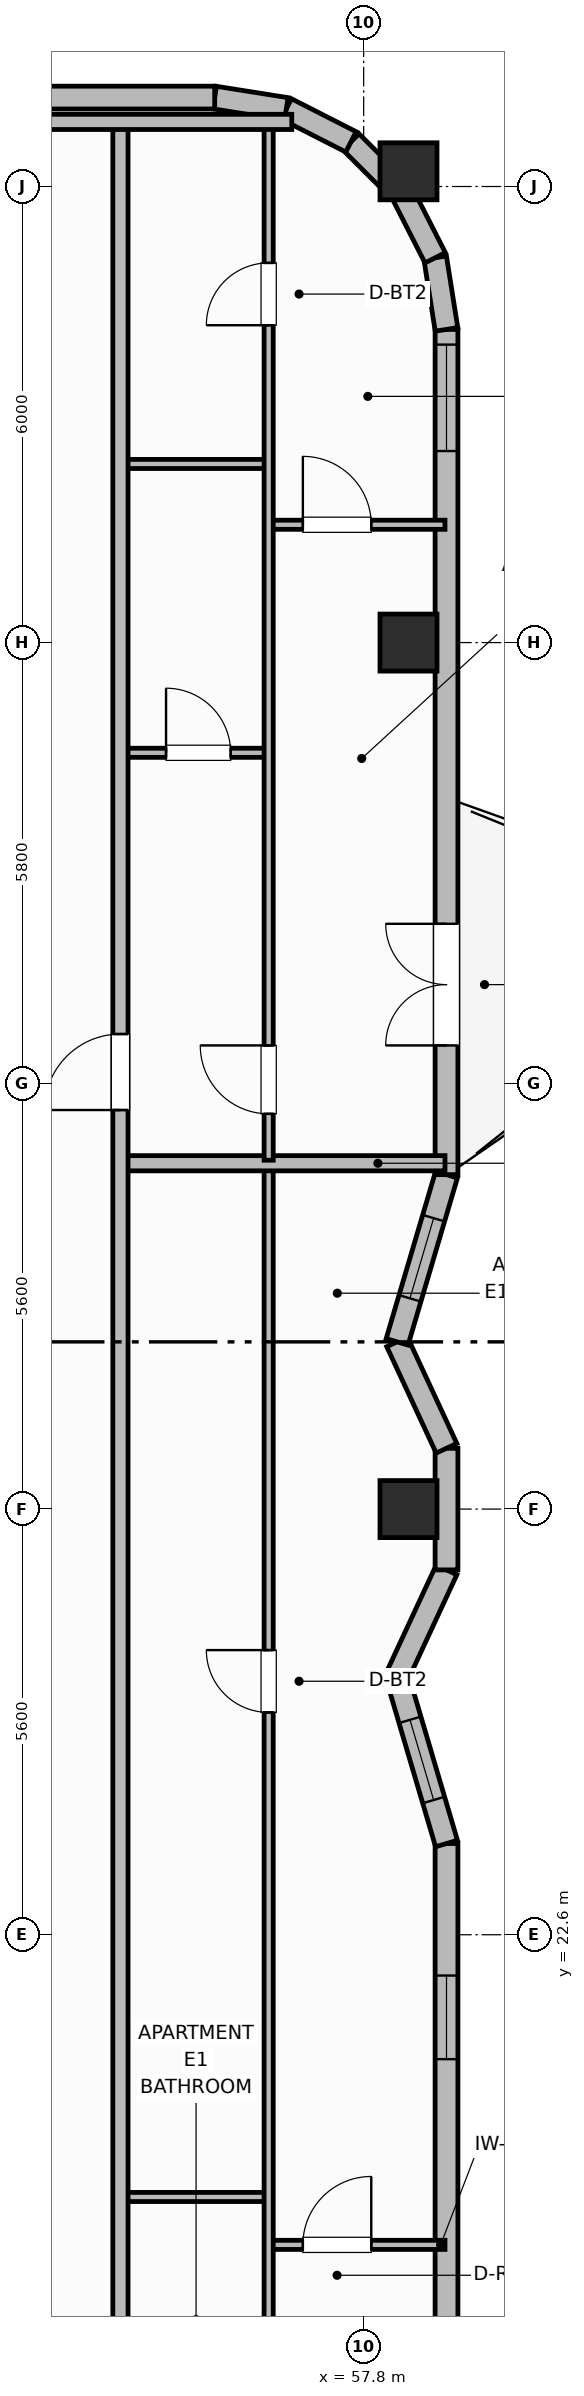
"""IFC4 building model, lengths in metres.
Left out: names, types, materials, properties, quantities, classifications, styles, units other than length and angle.
Written with IfcOpenShell. Run it as: python <this file> out.ifc"""

import sys

from ifc_helpers import new_model, si_unit, direction, frame, frame_2d, origin, origin_2d, place, context, subcontext, project, spatial, rectangle, extrude, element, fill, save


model = new_model("IFC4")
c1 = context("Model", 3, precision=1e-05, world=origin(), true_north=direction((0.0, 1.0)))
c2 = subcontext(c1, "Body", "Model", "MODEL_VIEW")
j1 = project(units=[si_unit("LENGTHUNIT", "METRE"), si_unit("PLANEANGLEUNIT", "RADIAN")], contexts=[c1])
p1 = place(None, origin())
s1 = spatial("IfcSite", under=j1, at=p1, CompositionType="ELEMENT")
p2 = place(p1, origin())
s2 = spatial("IfcBuilding", under=s1, at=p2, CompositionType="ELEMENT")
p3 = place(p2, frame((0.0, 0.0, 286.1)))
s3 = spatial("IfcBuildingStorey", under=s2, at=p3, CompositionType="ELEMENT", Elevation=286.1)
for number, where, z_axis, x_axis in (
    (1, (58.39, 28.2, 0.0), (0.0, 0.0, 1.0), (1.0, 0.0, 0.0)),
    (2, (58.39, 39.6, 0.0), (0.0, 0.0, 1.0), (1.0, 0.0, 0.0)),
    (3, (58.39, 45.8, 0.0), (0.0, 0.0, 1.0), (1.0, 0.0, 0.0)),
):
    element("IfcColumn", number, at=place(p3, frame(where, z_axis=z_axis, x_axis=x_axis)), inside=s3, PredefinedType="COLUMN", context=c2, shape_type="SweptSolid", body=[
        extrude(rectangle(XDim=0.75, YDim=0.75, at=origin_2d()), origin(), (0.0, 0.0, 1.0), 3.7),
    ])
p4 = place(p3, frame((58.89, 12.68, 0.0), z_axis=(0.0, 0.0, 1.0), x_axis=(0.0, 1.0, 0.0)))
e4 = element("IfcWall", 4, at=p4, inside=s3, PredefinedType="SOLIDWALL", context=c2, shape_type="SweptSolid", body=[
    extrude(rectangle(XDim=11.12, YDim=0.3, at=frame_2d((5.56, 0.0))), origin(), (0.0, 0.0, 1.0), 2.73),
])
p5 = place(p4, frame((1.737, 0.0, 0.95)))
e5 = element("IfcOpeningElement", 5, at=p5, cuts=e4, PredefinedType="OPENING", context=c2, shape_type="SweptSolid", body=[
    extrude(rectangle(XDim=1.1, YDim=1.65, at=frame_2d((0.55, 0.825))), frame((0.0, 0.16, 0.0), z_axis=(0.0, -1.0, 0.0), x_axis=(1.0, 0.0, 0.0)), (0.0, 0.0, 1.0), 0.32),
])
p6 = place(p4, frame((8.283, 0.0, 0.95)))
e6 = element("IfcOpeningElement", 6, at=p6, cuts=e4, PredefinedType="OPENING", context=c2, shape_type="SweptSolid", body=[
    extrude(rectangle(XDim=1.1, YDim=1.65, at=frame_2d((0.55, 0.825))), frame((0.0, 0.16, 0.0), z_axis=(0.0, -1.0, 0.0), x_axis=(1.0, 0.0, 0.0)), (0.0, 0.0, 1.0), 0.32),
])
p7 = place(p3, frame((58.89, 23.8, 0.0), z_axis=(0.0, 0.0, 1.0), x_axis=(-0.283312771328, 0.959027566654, 0.0)))
e7 = element("IfcWall", 7, at=p7, inside=s3, PredefinedType="SOLIDWALL", context=c2, shape_type="SweptSolid", body=[
    extrude(rectangle(XDim=2.294, YDim=0.3, at=frame_2d((1.147, 0.0))), origin(), (0.0, 0.0, 1.0), 2.73),
])
p8 = place(p7, frame((0.597, 0.0, 0.92)))
e8 = element("IfcOpeningElement", 8, at=p8, cuts=e7, PredefinedType="OPENING", context=c2, shape_type="SweptSolid", body=[
    extrude(rectangle(XDim=1.1, YDim=1.65, at=frame_2d((0.55, 0.825))), frame((0.0, 0.16, 0.0), z_axis=(0.0, -1.0, 0.0), x_axis=(1.0, 0.0, 0.0)), (0.0, 0.0, 1.0), 0.32),
])
p9 = place(p3, frame((58.24, 26.0, 0.0), z_axis=(0.0, 0.0, 1.0), x_axis=(0.421083420882, 0.907021914101, 0.0)))
e9 = element("IfcWall", 9, at=p9, inside=s3, PredefinedType="SOLIDWALL", context=c2, shape_type="SweptSolid", body=[
    extrude(rectangle(XDim=1.543, YDim=0.3, at=frame_2d((0.772, 0.0))), origin(), (0.0, 0.0, 1.0), 2.73),
])
p10 = place(p3, frame((58.89, 27.4, 0.0), z_axis=(0.0, 0.0, 1.0), x_axis=(0.0, 1.0, 0.0)))
e10 = element("IfcWall", 10, at=p10, inside=s3, PredefinedType="SOLIDWALL", context=c2, shape_type="SweptSolid", body=[
    extrude(rectangle(XDim=1.6, YDim=0.3, at=frame_2d((0.8, 0.0))), origin(), (0.0, 0.0, 1.0), 2.73),
])
p11 = place(p3, frame((58.89, 29.0, 0.0), z_axis=(0.0, 0.0, 1.0), x_axis=(-0.421083420882, 0.907021914101, 0.0)))
e11 = element("IfcWall", 11, at=p11, inside=s3, PredefinedType="SOLIDWALL", context=c2, shape_type="SweptSolid", body=[
    extrude(rectangle(XDim=1.543, YDim=0.3, at=frame_2d((0.772, 0.0))), origin(), (0.0, 0.0, 1.0), 2.73),
])
p12 = place(p3, frame((58.24, 30.4, 0.0), z_axis=(0.0, 0.0, 1.0), x_axis=(0.28328385701, 0.959036107953, 0.0)))
e12 = element("IfcWall", 12, at=p12, inside=s3, PredefinedType="SOLIDWALL", context=c2, shape_type="SweptSolid", body=[
    extrude(rectangle(XDim=2.294, YDim=0.3, at=frame_2d((1.147, 0.0))), origin(), (0.0, 0.0, 1.0), 2.73),
])
p13 = place(p12, frame((0.597, 0.0, 0.92)))
e13 = element("IfcOpeningElement", 13, at=p13, cuts=e12, PredefinedType="OPENING", context=c2, shape_type="SweptSolid", body=[
    extrude(rectangle(XDim=1.1, YDim=1.65, at=frame_2d((0.55, 0.825))), frame((0.0, 0.16, 0.0), z_axis=(0.0, -1.0, 0.0), x_axis=(1.0, 0.0, 0.0)), (0.0, 0.0, 1.0), 0.32),
])
p14 = place(p3, frame((58.89, 32.6, 0.0), z_axis=(0.0, 0.0, 1.0), x_axis=(0.0, 1.0, 0.0)))
e14 = element("IfcWall", 14, at=p14, inside=s3, PredefinedType="SOLIDWALL", context=c2, shape_type="SweptSolid", body=[
    extrude(rectangle(XDim=11.12, YDim=0.3, at=frame_2d((5.56, 0.0))), origin(), (0.0, 0.0, 1.0), 2.73),
])
p15 = place(p14, frame((1.7, 0.0, 0.0)))
e15 = element("IfcOpeningElement", 15, at=p15, cuts=e14, PredefinedType="OPENING", context=c2, shape_type="SweptSolid", body=[
    extrude(rectangle(XDim=1.6, YDim=2.1, at=frame_2d((0.8, 1.05))), frame((0.0, 0.16, 0.0), z_axis=(0.0, -1.0, 0.0), x_axis=(1.0, 0.0, 0.0)), (0.0, 0.0, 1.0), 0.32),
])
p16 = place(p14, frame((9.52, 0.0, 0.72)))
e16 = element("IfcOpeningElement", 16, at=p16, cuts=e14, PredefinedType="OPENING", context=c2, shape_type="SweptSolid", body=[
    extrude(rectangle(XDim=1.4, YDim=1.85, at=frame_2d((0.7, 0.925))), frame((0.0, 0.16, 0.0), z_axis=(0.0, -1.0, 0.0), x_axis=(1.0, 0.0, 0.0)), (0.0, 0.0, 1.0), 0.32),
])
p17 = place(p3, frame((58.89, 43.72, 0.0), z_axis=(0.0, 0.0, 1.0), x_axis=(-0.156304114255, 0.987708977314, 0.0)))
e17 = element("IfcWall", 17, at=p17, inside=s3, PredefinedType="SOLIDWALL", context=c2, shape_type="SweptSolid", body=[
    extrude(rectangle(XDim=0.954, YDim=0.3, at=frame_2d((0.477, 0.0))), origin(), (0.0, 0.0, 1.0), 2.73),
])
p18 = place(p3, frame((58.741, 44.663, 0.0), z_axis=(0.0, 0.0, 1.0), x_axis=(-0.45395644796, 0.891023873617, 0.0)))
e18 = element("IfcWall", 18, at=p18, inside=s3, PredefinedType="SOLIDWALL", context=c2, shape_type="SweptSolid", body=[
    extrude(rectangle(XDim=0.954, YDim=0.3, at=frame_2d((0.477, 0.0))), origin(), (0.0, 0.0, 1.0), 2.73),
])
for number, where, z_axis, x_axis in (
    (19, (58.308, 45.513, 0.0), (0.0, 0.0, 1.0), (-0.707, 0.707, 0.0)),
    (20, (57.633, 46.188, 0.0), (0.0, 0.0, 1.0), (-0.891, 0.454, 0.0)),
):
    element("IfcWall", number, at=place(p3, frame(where, z_axis=z_axis, x_axis=x_axis)), inside=s3, PredefinedType="SOLIDWALL", context=c2, shape_type="SweptSolid", body=[
        extrude(rectangle(XDim=0.954, YDim=0.3, at=frame_2d((0.477, 0.0))), origin(), (0.0, 0.0, 1.0), 2.73),
    ])
p19 = place(p3, frame((56.782, 46.621, 0.0), z_axis=(0.0, 0.0, 1.0), x_axis=(-0.987663181641, 0.156593229835, 0.0)))
e21 = element("IfcWall", 21, at=p19, inside=s3, PredefinedType="SOLIDWALL", context=c2, shape_type="SweptSolid", body=[
    extrude(rectangle(XDim=0.954, YDim=0.3, at=frame_2d((0.477, 0.0))), origin(), (0.0, 0.0, 1.0), 2.73),
])
p20 = place(p3, frame((55.84, 46.77, 0.0), z_axis=(0.0, 0.0, 1.0), x_axis=(-1.0, 0.0, 0.0)))
e22 = element("IfcWall", 22, at=p20, inside=s3, PredefinedType="SOLIDWALL", context=c2, shape_type="SweptSolid", body=[
    extrude(rectangle(XDim=33.28, YDim=0.3, at=frame_2d((16.64, 0.0))), origin(), (0.0, 0.0, 1.0), 2.73),
])
p21 = place(p20, frame((5.08, 0.0, 0.76)))
e23 = element("IfcOpeningElement", 23, at=p21, cuts=e22, PredefinedType="OPENING", context=c2, shape_type="SweptSolid", body=[
    extrude(rectangle(XDim=1.8, YDim=1.85, at=frame_2d((0.9, 0.925))), frame((0.0, 0.16, 0.0), z_axis=(0.0, -1.0, 0.0), x_axis=(1.0, 0.0, 0.0)), (0.0, 0.0, 1.0), 0.32),
])
p22 = place(p20, frame((8.633, 0.0, 0.76)))
e24 = element("IfcOpeningElement", 24, at=p22, cuts=e22, PredefinedType="OPENING", context=c2, shape_type="SweptSolid", body=[
    extrude(rectangle(XDim=1.8, YDim=1.85, at=frame_2d((0.9, 0.925))), frame((0.0, 0.16, 0.0), z_axis=(0.0, -1.0, 0.0), x_axis=(1.0, 0.0, 0.0)), (0.0, 0.0, 1.0), 0.32),
])
p23 = place(p20, frame((15.74, 0.0, 0.76)))
e25 = element("IfcOpeningElement", 25, at=p23, cuts=e22, PredefinedType="OPENING", context=c2, shape_type="SweptSolid", body=[
    extrude(rectangle(XDim=1.8, YDim=1.85, at=frame_2d((0.9, 0.925))), frame((0.0, 0.16, 0.0), z_axis=(0.0, -1.0, 0.0), x_axis=(1.0, 0.0, 0.0)), (0.0, 0.0, 1.0), 0.32),
])
p24 = place(p20, frame((22.847, 0.0, 0.76)))
e26 = element("IfcOpeningElement", 26, at=p24, cuts=e22, PredefinedType="OPENING", context=c2, shape_type="SweptSolid", body=[
    extrude(rectangle(XDim=1.8, YDim=1.85, at=frame_2d((0.9, 0.925))), frame((0.0, 0.16, 0.0), z_axis=(0.0, -1.0, 0.0), x_axis=(1.0, 0.0, 0.0)), (0.0, 0.0, 1.0), 0.32),
])
p25 = place(p20, frame((26.4, 0.0, 0.76)))
e27 = element("IfcOpeningElement", 27, at=p25, cuts=e22, PredefinedType="OPENING", context=c2, shape_type="SweptSolid", body=[
    extrude(rectangle(XDim=1.8, YDim=1.85, at=frame_2d((0.9, 0.925))), frame((0.0, 0.16, 0.0), z_axis=(0.0, -1.0, 0.0), x_axis=(1.0, 0.0, 0.0)), (0.0, 0.0, 1.0), 0.32),
])
p26 = place(p3, frame((54.6, 19.15, 0.0), z_axis=(0.0, 0.0, 1.0), x_axis=(1.0, 0.0, 0.0)))
e28 = element("IfcWall", 28, at=p26, inside=s3, PredefinedType="PARTITIONING", context=c2, shape_type="SweptSolid", body=[
    extrude(rectangle(XDim=1.95, YDim=0.12, at=frame_2d((0.975, 0.0))), origin(), (0.0, 0.0, 1.0), 2.56),
])
p27 = place(p3, frame((56.55, 18.52, 0.0), z_axis=(0.0, 0.0, 1.0), x_axis=(1.0, 0.0, 0.0)))
e29 = element("IfcWall", 29, at=p27, inside=s3, PredefinedType="PARTITIONING", context=c2, shape_type="SweptSolid", body=[
    extrude(rectangle(XDim=2.32, YDim=0.12, at=frame_2d((1.16, 0.0))), origin(), (0.0, 0.0, 1.0), 2.56),
])
p28 = place(p27, frame((0.45, 0.0, 0.0)))
e30 = element("IfcOpeningElement", 30, at=p28, cuts=e29, PredefinedType="OPENING", context=c2, shape_type="SweptSolid", body=[
    extrude(rectangle(XDim=0.9, YDim=2.1, at=frame_2d((0.45, 1.05))), frame((0.0, 0.07, 0.0), z_axis=(0.0, -1.0, 0.0), x_axis=(1.0, 0.0, 0.0)), (0.0, 0.0, 1.0), 0.14),
])
p29 = place(p3, frame((56.55, 9.99, 0.0), z_axis=(0.0, 0.0, 1.0), x_axis=(0.0, 1.0, 0.0)))
e31 = element("IfcWall", 31, at=p29, inside=s3, PredefinedType="PARTITIONING", context=c2, shape_type="SweptSolid", body=[
    extrude(rectangle(XDim=22.72, YDim=0.12, at=frame_2d((11.36, 0.0))), origin(), (0.0, 0.0, 1.0), 2.56),
])
p30 = place(p29, frame((0.41, 0.0, 0.0)))
e32 = element("IfcOpeningElement", 32, at=p30, cuts=e31, PredefinedType="OPENING", context=c2, shape_type="SweptSolid", body=[
    extrude(rectangle(XDim=0.9, YDim=2.1, at=frame_2d((0.45, 1.05))), frame((0.0, 0.07, 0.0), z_axis=(0.0, -1.0, 0.0), x_axis=(1.0, 0.0, 0.0)), (0.0, 0.0, 1.0), 0.14),
])
p31 = place(p29, frame((15.535, 0.0, 0.0)))
e33 = element("IfcOpeningElement", 33, at=p31, cuts=e31, PredefinedType="OPENING", context=c2, shape_type="SweptSolid", body=[
    extrude(rectangle(XDim=0.82, YDim=2.08, at=frame_2d((0.41, 1.04))), frame((0.0, 0.07, 0.0), z_axis=(0.0, -1.0, 0.0), x_axis=(1.0, 0.0, 0.0)), (0.0, 0.0, 1.0), 0.14),
])
p32 = place(p3, frame((54.6, 32.75, 0.0), z_axis=(0.0, 0.0, 1.0), x_axis=(1.0, 0.0, 0.0)))
e34 = element("IfcWall", 34, at=p32, inside=s3, PredefinedType="PARTITIONING", context=c2, shape_type="SweptSolid", body=[
    extrude(rectangle(XDim=4.27, YDim=0.2, at=frame_2d((2.135, 0.0))), origin(), (0.0, 0.0, 1.0), 2.56),
])
p33 = place(p3, frame((54.6, 38.15, 0.0), z_axis=(0.0, 0.0, 1.0), x_axis=(1.0, 0.0, 0.0)))
e35 = element("IfcWall", 35, at=p33, inside=s3, PredefinedType="PARTITIONING", context=c2, shape_type="SweptSolid", body=[
    extrude(rectangle(XDim=1.95, YDim=0.12, at=frame_2d((0.975, 0.0))), origin(), (0.0, 0.0, 1.0), 2.56),
])
p34 = place(p33, frame((0.6, 0.0, 0.0)))
e36 = element("IfcOpeningElement", 36, at=p34, cuts=e35, PredefinedType="OPENING", context=c2, shape_type="SweptSolid", body=[
    extrude(rectangle(XDim=0.85, YDim=2.1, at=frame_2d((0.425, 1.05))), frame((0.0, 0.07, 0.0), z_axis=(0.0, -1.0, 0.0), x_axis=(1.0, 0.0, 0.0)), (0.0, 0.0, 1.0), 0.14),
])
p35 = place(p3, frame((54.6, 41.95, 0.0), z_axis=(0.0, 0.0, 1.0), x_axis=(1.0, 0.0, 0.0)))
e37 = element("IfcWall", 37, at=p35, inside=s3, PredefinedType="PARTITIONING", context=c2, shape_type="SweptSolid", body=[
    extrude(rectangle(XDim=1.95, YDim=0.12, at=frame_2d((0.975, 0.0))), origin(), (0.0, 0.0, 1.0), 2.56),
])
p36 = place(p3, frame((56.55, 41.15, 0.0), z_axis=(0.0, 0.0, 1.0), x_axis=(1.0, 0.0, 0.0)))
e38 = element("IfcWall", 38, at=p36, inside=s3, PredefinedType="PARTITIONING", context=c2, shape_type="SweptSolid", body=[
    extrude(rectangle(XDim=2.32, YDim=0.12, at=frame_2d((1.16, 0.0))), origin(), (0.0, 0.0, 1.0), 2.56),
])
p37 = place(p36, frame((0.45, 0.0, 0.0)))
e39 = element("IfcOpeningElement", 39, at=p37, cuts=e38, PredefinedType="OPENING", context=c2, shape_type="SweptSolid", body=[
    extrude(rectangle(XDim=0.9, YDim=2.1, at=frame_2d((0.45, 1.05))), frame((0.0, 0.07, 0.0), z_axis=(0.0, -1.0, 0.0), x_axis=(1.0, 0.0, 0.0)), (0.0, 0.0, 1.0), 0.14),
])
p38 = place(p3, frame((56.55, 32.79, 0.0), z_axis=(0.0, 0.0, 1.0), x_axis=(0.0, 1.0, 0.0)))
e40 = element("IfcWall", 40, at=p38, inside=s3, PredefinedType="PARTITIONING", context=c2, shape_type="SweptSolid", body=[
    extrude(rectangle(XDim=13.62, YDim=0.12, at=frame_2d((6.81, 0.0))), origin(), (0.0, 0.0, 1.0), 2.56),
])
p39 = place(p38, frame((0.61, 0.0, 0.0)))
e41 = element("IfcOpeningElement", 41, at=p39, cuts=e40, PredefinedType="OPENING", context=c2, shape_type="SweptSolid", body=[
    extrude(rectangle(XDim=0.9, YDim=2.1, at=frame_2d((0.45, 1.05))), frame((0.0, 0.07, 0.0), z_axis=(0.0, -1.0, 0.0), x_axis=(1.0, 0.0, 0.0)), (0.0, 0.0, 1.0), 0.14),
])
p40 = place(p38, frame((10.985, 0.0, 0.0)))
e42 = element("IfcOpeningElement", 42, at=p40, cuts=e40, PredefinedType="OPENING", context=c2, shape_type="SweptSolid", body=[
    extrude(rectangle(XDim=0.82, YDim=2.08, at=frame_2d((0.41, 1.04))), frame((0.0, 0.07, 0.0), z_axis=(0.0, -1.0, 0.0), x_axis=(1.0, 0.0, 0.0)), (0.0, 0.0, 1.0), 0.14),
])
p41 = place(p3, frame((54.6, 9.95, 0.0), z_axis=(0.0, 0.0, 1.0), x_axis=(0.0, 1.0, 0.0)))
e43 = element("IfcWall", 43, at=p41, inside=s3, PredefinedType="PARTITIONING", context=c2, shape_type="SweptSolid", body=[
    extrude(rectangle(XDim=36.5, YDim=0.2, at=frame_2d((18.25, 0.0))), origin(), (0.0, 0.0, 1.0), 2.56),
])
p42 = place(p41, frame((3.25, 0.0, 0.0)))
e44 = element("IfcOpeningElement", 44, at=p42, cuts=e43, PredefinedType="OPENING", context=c2, shape_type="SweptSolid", body=[
    extrude(rectangle(XDim=1.0, YDim=2.15, at=frame_2d((0.5, 1.075))), frame((0.0, 0.11, 0.0), z_axis=(0.0, -1.0, 0.0), x_axis=(1.0, 0.0, 0.0)), (0.0, 0.0, 1.0), 0.22),
])
p43 = place(p41, frame((23.5, 0.0, 0.0)))
e45 = element("IfcOpeningElement", 45, at=p43, cuts=e43, PredefinedType="OPENING", context=c2, shape_type="SweptSolid", body=[
    extrude(rectangle(XDim=1.0, YDim=2.15, at=frame_2d((0.5, 1.075))), frame((0.0, 0.11, 0.0), z_axis=(0.0, -1.0, 0.0), x_axis=(1.0, 0.0, 0.0)), (0.0, 0.0, 1.0), 0.22),
])
p44 = place(p3, frame((53.1, 46.45, 0.0), z_axis=(0.0, 0.0, 1.0), x_axis=(1.0, 0.0, 0.0)))
e46 = element("IfcWall", 46, at=p44, inside=s3, PredefinedType="PARTITIONING", context=c2, shape_type="SweptSolid", body=[
    extrude(rectangle(XDim=3.754, YDim=0.2, at=frame_2d((1.877, 0.0))), origin(), (0.0, 0.0, 1.0), 2.56),
])
p45 = place(p6, origin())
e47 = element("IfcWindow", 47, at=p45, inside=s3, PartitioningType="SINGLE_PANEL", PredefinedType="WINDOW", context=c2, shape_type="SweptSolid", body=[
    extrude(rectangle(XDim=1.1, YDim=1.65, at=frame_2d((0.55, 0.825))), frame((0.0, 0.03, 0.0), z_axis=(0.0, -1.0, 0.0), x_axis=(1.0, 0.0, 0.0)), (0.0, 0.0, 1.0), 0.06),
])
fill(e6, e47)
p46 = place(p8, origin())
e48 = element("IfcWindow", 48, at=p46, inside=s3, PartitioningType="SINGLE_PANEL", PredefinedType="WINDOW", context=c2, shape_type="SweptSolid", body=[
    extrude(rectangle(XDim=1.1, YDim=1.65, at=frame_2d((0.55, 0.825))), frame((0.0, 0.03, 0.0), z_axis=(0.0, -1.0, 0.0), x_axis=(1.0, 0.0, 0.0)), (0.0, 0.0, 1.0), 0.06),
])
fill(e8, e48)
p47 = place(p13, origin())
e49 = element("IfcWindow", 49, at=p47, inside=s3, PartitioningType="SINGLE_PANEL", PredefinedType="WINDOW", context=c2, shape_type="SweptSolid", body=[
    extrude(rectangle(XDim=1.1, YDim=1.65, at=frame_2d((0.55, 0.825))), frame((0.0, 0.03, 0.0), z_axis=(0.0, -1.0, 0.0), x_axis=(1.0, 0.0, 0.0)), (0.0, 0.0, 1.0), 0.06),
])
fill(e13, e49)
p48 = place(p15, origin())
e50 = element("IfcDoor", 50, at=p48, inside=s3, OperationType="DOUBLE_DOOR_SINGLE_SWING", PredefinedType="DOOR", context=c2, shape_type="SweptSolid", body=[
    extrude(rectangle(XDim=1.6, YDim=2.1, at=frame_2d((0.8, 1.05))), frame((0.0, 0.025, 0.0), z_axis=(0.0, -1.0, 0.0), x_axis=(1.0, 0.0, 0.0)), (0.0, 0.0, 1.0), 0.05),
])
fill(e15, e50)
p49 = place(p16, origin())
e51 = element("IfcWindow", 51, at=p49, inside=s3, PartitioningType="SINGLE_PANEL", PredefinedType="WINDOW", context=c2, shape_type="SweptSolid", body=[
    extrude(rectangle(XDim=1.4, YDim=1.85, at=frame_2d((0.7, 0.925))), frame((0.0, 0.03, 0.0), z_axis=(0.0, -1.0, 0.0), x_axis=(1.0, 0.0, 0.0)), (0.0, 0.0, 1.0), 0.06),
])
fill(e16, e51)
p50 = place(p28, origin())
e52 = element("IfcDoor", 52, at=p50, inside=s3, OperationType="SINGLE_SWING_RIGHT", PredefinedType="DOOR", context=c2, shape_type="SweptSolid", body=[
    extrude(rectangle(XDim=0.9, YDim=2.1, at=frame_2d((0.45, 1.05))), frame((0.0, 0.025, 0.0), z_axis=(0.0, -1.0, 0.0), x_axis=(1.0, 0.0, 0.0)), (0.0, 0.0, 1.0), 0.05),
])
fill(e30, e52)
p51 = place(p31, origin())
e53 = element("IfcDoor", 53, at=p51, inside=s3, OperationType="SINGLE_SWING_RIGHT", PredefinedType="DOOR", context=c2, shape_type="SweptSolid", body=[
    extrude(rectangle(XDim=0.82, YDim=2.08, at=frame_2d((0.41, 1.04))), frame((0.0, 0.025, 0.0), z_axis=(0.0, -1.0, 0.0), x_axis=(1.0, 0.0, 0.0)), (0.0, 0.0, 1.0), 0.05),
])
fill(e33, e53)
p52 = place(p34, origin())
e54 = element("IfcDoor", 54, at=p52, inside=s3, OperationType="SINGLE_SWING_LEFT", PredefinedType="DOOR", context=c2, shape_type="SweptSolid", body=[
    extrude(rectangle(XDim=0.85, YDim=2.1, at=frame_2d((0.425, 1.05))), frame((0.0, 0.025, 0.0), z_axis=(0.0, -1.0, 0.0), x_axis=(1.0, 0.0, 0.0)), (0.0, 0.0, 1.0), 0.05),
])
fill(e36, e54)
p53 = place(p37, origin())
e55 = element("IfcDoor", 55, at=p53, inside=s3, OperationType="SINGLE_SWING_LEFT", PredefinedType="DOOR", context=c2, shape_type="SweptSolid", body=[
    extrude(rectangle(XDim=0.9, YDim=2.1, at=frame_2d((0.45, 1.05))), frame((0.0, 0.025, 0.0), z_axis=(0.0, -1.0, 0.0), x_axis=(1.0, 0.0, 0.0)), (0.0, 0.0, 1.0), 0.05),
])
fill(e39, e55)
p54 = place(p39, origin())
e56 = element("IfcDoor", 56, at=p54, inside=s3, OperationType="SINGLE_SWING_RIGHT", PredefinedType="DOOR", context=c2, shape_type="SweptSolid", body=[
    extrude(rectangle(XDim=0.9, YDim=2.1, at=frame_2d((0.45, 1.05))), frame((0.0, 0.025, 0.0), z_axis=(0.0, -1.0, 0.0), x_axis=(1.0, 0.0, 0.0)), (0.0, 0.0, 1.0), 0.05),
])
fill(e41, e56)
p55 = place(p40, origin())
e57 = element("IfcDoor", 57, at=p55, inside=s3, OperationType="SINGLE_SWING_LEFT", PredefinedType="DOOR", context=c2, shape_type="SweptSolid", body=[
    extrude(rectangle(XDim=0.82, YDim=2.08, at=frame_2d((0.41, 1.04))), frame((0.0, 0.025, 0.0), z_axis=(0.0, -1.0, 0.0), x_axis=(1.0, 0.0, 0.0)), (0.0, 0.0, 1.0), 0.05),
])
fill(e42, e57)
p56 = place(p43, origin())
e58 = element("IfcDoor", 58, at=p56, inside=s3, OperationType="SINGLE_SWING_LEFT", PredefinedType="DOOR", context=c2, shape_type="SweptSolid", body=[
    extrude(rectangle(XDim=1.0, YDim=2.15, at=frame_2d((0.5, 1.075))), frame((0.0, 0.025, 0.0), z_axis=(0.0, -1.0, 0.0), x_axis=(1.0, 0.0, 0.0)), (0.0, 0.0, 1.0), 0.05),
])
fill(e45, e58)
save(model, sys.argv[1])
